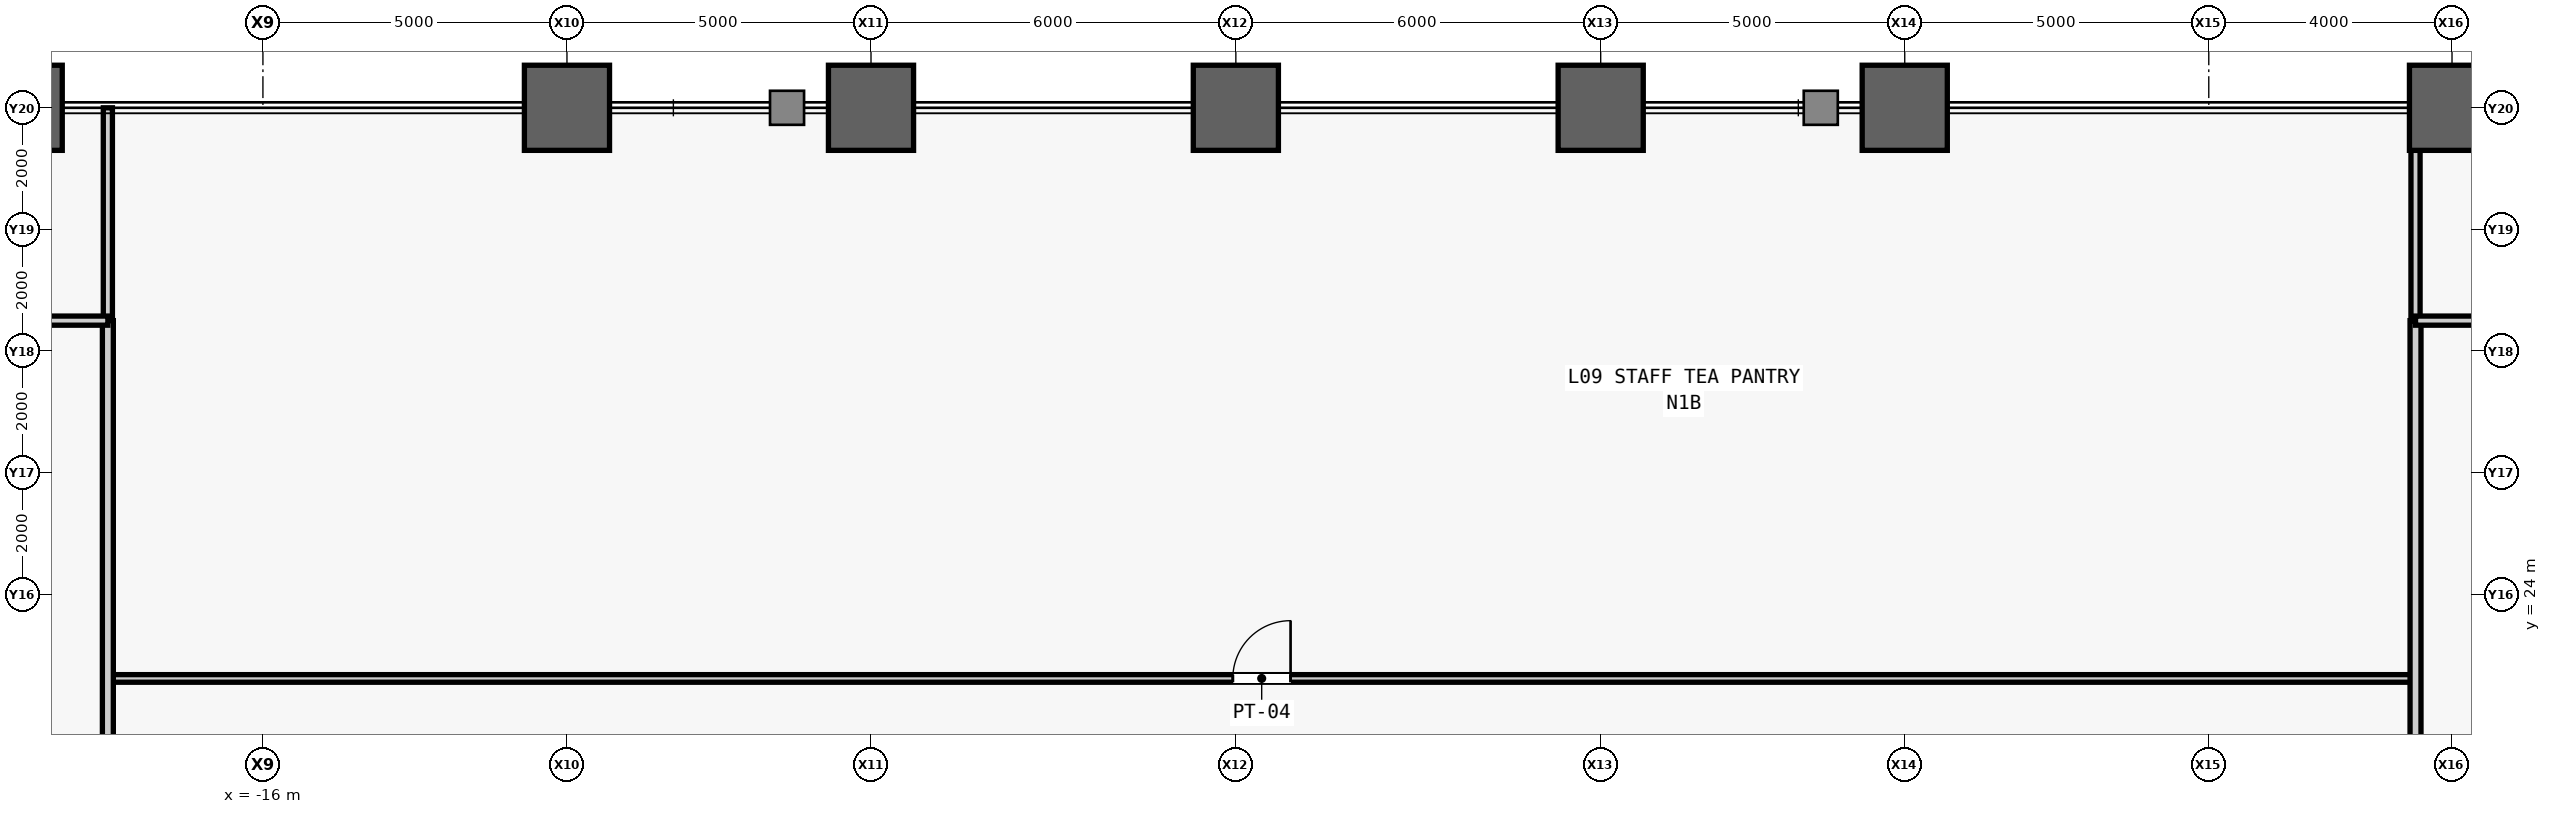
"""IFC4 building model, lengths in metres.
Left out: names, types, materials, properties, quantities, classifications, styles, units other than length and angle.
Written with IfcOpenShell. Run it as: python <this file> out.ifc"""

import sys

from ifc_helpers import new_model, si_unit, direction, frame, frame_2d, origin, origin_2d, place, context, subcontext, project, spatial, rectangle, hollow_rectangle, extrude, source, transform, mapped, element, fill, save


model = new_model("IFC4")
c1 = context("Model", 3, precision=1e-05, world=origin(), true_north=direction((0.0, 1.0)))
c2 = subcontext(c1, "Body", "Model", "MODEL_VIEW")
j1 = project(units=[si_unit("LENGTHUNIT", "METRE"), si_unit("PLANEANGLEUNIT", "RADIAN")], contexts=[c1])
p1 = place(None, origin())
s1 = spatial("IfcSite", under=j1, at=p1, CompositionType="ELEMENT")
p2 = place(p1, origin())
s2 = spatial("IfcBuilding", under=s1, at=p2, CompositionType="ELEMENT")
p3 = place(p2, frame((0.0, 0.0, 45.2)))
s3 = spatial("IfcBuildingStorey", under=s2, at=p3, CompositionType="ELEMENT", Elevation=45.2)
m1 = source(origin(), c2, "Body", "SweptSolid", [
    extrude(hollow_rectangle(XDim=1.4, YDim=1.4, WallThickness=0.075, at=origin_2d()), origin(), (0.0, 0.0, 1.0), 4.2),
])
for number, where, z_axis, x_axis in (
    (1, (-20.0, 32.0, 0.0), (0.0, 0.0, 1.0), (1.0, 0.0, 0.0)),
    (2, (-11.0, 32.0, 0.0), (0.0, 0.0, 1.0), (1.0, 0.0, 0.0)),
    (3, (-6.0, 32.0, 0.0), (0.0, 0.0, 1.0), (1.0, 0.0, 0.0)),
    (4, (0.0, 32.0, 0.0), (0.0, 0.0, 1.0), (1.0, 0.0, 0.0)),
    (5, (6.0, 32.0, 0.0), (0.0, 0.0, 1.0), (1.0, 0.0, 0.0)),
    (6, (11.0, 32.0, 0.0), (0.0, 0.0, 1.0), (1.0, 0.0, 0.0)),
    (7, (20.0, 32.0, 0.0), (0.0, 0.0, 1.0), (1.0, 0.0, 0.0)),
):
    element("IfcColumn", number, at=place(p3, frame(where, z_axis=z_axis, x_axis=x_axis)), inside=s3, PredefinedType="COLUMN", context=c2, shape_type="MappedRepresentation", body=[
        mapped(m1, transform((0.0, 0.0, 0.0), scale=1.0)),
    ])
m2 = source(origin(), c2, "Body", "SweptSolid", [
    extrude(rectangle(XDim=37.95, YDim=0.125, at=frame_2d((18.975, 0.0))), origin(), (0.0, 0.0, 1.0), 3.94),
])
p4 = place(p3, frame((-18.55, 22.616, 0.0), z_axis=(0.0, 0.0, 1.0), x_axis=(1.0, 0.0, 0.0)))
e8 = element("IfcWall", 8, at=p4, inside=s3, PredefinedType="PARTITIONING", context=c2, shape_type="MappedRepresentation", body=[
    mapped(m2, transform((0.0, 0.0, 0.0), scale=1.0)),
])
m3 = source(origin(), c2, "Body", "SweptSolid", [
    extrude(rectangle(XDim=0.95, YDim=2.15, at=frame_2d((0.475, 1.075))), frame((0.0, 0.073, 0.0), z_axis=(0.0, -1.0, 0.0), x_axis=(1.0, 0.0, 0.0)), (0.0, 0.0, 1.0), 0.145),
])
p5 = place(p4, frame((18.5, 0.0, 0.0)))
e9 = element("IfcOpeningElement", 9, at=p5, cuts=e8, PredefinedType="OPENING", context=c2, shape_type="MappedRepresentation", body=[
    mapped(m3, transform((0.0, 0.0, 0.0), scale=1.0)),
])
m4 = source(origin(), c2, "Body", "SweptSolid", [
    extrude(rectangle(XDim=3.5, YDim=0.15, at=frame_2d((1.75, 0.0))), origin(), (0.0, 0.0, 1.0), 3.94),
])
for number, where, z_axis, x_axis in (
    (10, (-18.55, 28.5, 0.0), (0.0, 0.0, 1.0), (0.0, 1.0, 0.0)),
    (11, (19.4, 28.5, 0.0), (0.0, 0.0, 1.0), (0.0, 1.0, 0.0)),
):
    element("IfcWall", number, at=place(p3, frame(where, z_axis=z_axis, x_axis=x_axis)), inside=s3, PredefinedType="PARTITIONING", context=c2, shape_type="MappedRepresentation", body=[
        mapped(m4, transform((0.0, 0.0, 0.0), scale=1.0)),
    ])
m5 = source(origin(), c2, "Body", "SweptSolid", [
    extrude(rectangle(XDim=57.0, YDim=0.18, at=frame_2d((28.5, 0.0))), origin(), (0.0, 0.0, 1.0), 3.94),
])
p6 = place(p3, frame((-18.55, -28.5, 0.0), z_axis=(0.0, 0.0, 1.0), x_axis=(0.0, 1.0, 0.0)))
e12 = element("IfcWall", 12, at=p6, inside=s3, PredefinedType="PARTITIONING", context=c2, shape_type="MappedRepresentation", body=[
    mapped(m5, transform((0.0, 0.0, 0.0), scale=1.0)),
])
m6 = source(origin(), c2, "Body", "SweptSolid", [
    extrude(rectangle(XDim=0.95, YDim=2.15, at=frame_2d((0.475, 1.075))), frame((0.0, 0.1, 0.0), z_axis=(0.0, -1.0, 0.0), x_axis=(1.0, 0.0, 0.0)), (0.0, 0.0, 1.0), 0.2),
])
p7 = place(p6, frame((18.615, 0.0, 0.0)))
e13 = element("IfcOpeningElement", 13, at=p7, cuts=e12, PredefinedType="OPENING", context=c2, shape_type="MappedRepresentation", body=[
    mapped(m6, transform((0.0, 0.0, 0.0), scale=1.0)),
])
p8 = place(p6, frame((27.472, 0.0, 0.0)))
e14 = element("IfcOpeningElement", 14, at=p8, cuts=e12, PredefinedType="OPENING", context=c2, shape_type="MappedRepresentation", body=[
    mapped(m6, transform((0.0, 0.0, 0.0), scale=1.0)),
])
p9 = place(p6, frame((36.607, 0.0, 0.0)))
e15 = element("IfcOpeningElement", 15, at=p9, cuts=e12, PredefinedType="OPENING", context=c2, shape_type="MappedRepresentation", body=[
    mapped(m6, transform((0.0, 0.0, 0.0), scale=1.0)),
])
m7 = source(origin(), c2, "Body", "SweptSolid", [
    extrude(rectangle(XDim=57.0, YDim=0.18, at=frame_2d((28.5, 0.0))), origin(), (0.0, 0.0, 1.0), 3.471),
])
p10 = place(p3, frame((19.4, -28.5, 0.0), z_axis=(0.0, 0.0, 1.0), x_axis=(0.0, 1.0, 0.0)))
e16 = element("IfcWall", 16, at=p10, inside=s3, PredefinedType="PARTITIONING", context=c2, shape_type="MappedRepresentation", body=[
    mapped(m7, transform((0.0, 0.0, 0.0), scale=1.0)),
])
p11 = place(p10, frame((27.75, 0.0, 0.0)))
e17 = element("IfcOpeningElement", 17, at=p11, cuts=e16, PredefinedType="OPENING", context=c2, shape_type="MappedRepresentation", body=[
    mapped(m6, transform((0.0, 0.0, 0.0), scale=1.0)),
])
m8 = source(origin(), c2, "Body", "SweptSolid", [
    extrude(rectangle(XDim=9.95, YDim=0.15, at=frame_2d((4.975, 0.0))), origin(), (0.0, 0.0, 1.0), 3.94),
])
p12 = place(p3, frame((-28.5, 28.5, 0.0), z_axis=(0.0, 0.0, 1.0), x_axis=(1.0, 0.0, 0.0)))
e18 = element("IfcWall", 18, at=p12, inside=s3, PredefinedType="PARTITIONING", context=c2, shape_type="MappedRepresentation", body=[
    mapped(m8, transform((0.0, 0.0, 0.0), scale=1.0)),
])
m9 = source(origin(), c2, "Body", "SweptSolid", [
    extrude(rectangle(XDim=0.95, YDim=2.15, at=frame_2d((0.475, 1.075))), frame((0.0, 0.085, 0.0), z_axis=(0.0, -1.0, 0.0), x_axis=(1.0, 0.0, 0.0)), (0.0, 0.0, 1.0), 0.17),
])
p13 = place(p12, frame((4.5, 0.0, 0.0)))
e19 = element("IfcOpeningElement", 19, at=p13, cuts=e18, PredefinedType="OPENING", context=c2, shape_type="MappedRepresentation", body=[
    mapped(m9, transform((0.0, 0.0, 0.0), scale=1.0)),
])
m10 = source(origin(), c2, "Body", "SweptSolid", [
    extrude(rectangle(XDim=9.1, YDim=0.15, at=frame_2d((4.55, 0.0))), origin(), (0.0, 0.0, 1.0), 3.94),
])
p14 = place(p3, frame((19.4, 28.5, 0.0), z_axis=(0.0, 0.0, 1.0), x_axis=(1.0, 0.0, 0.0)))
e20 = element("IfcWall", 20, at=p14, inside=s3, PredefinedType="PARTITIONING", context=c2, shape_type="MappedRepresentation", body=[
    mapped(m10, transform((0.0, 0.0, 0.0), scale=1.0)),
])
p15 = place(p14, frame((4.075, 0.0, 0.0)))
e21 = element("IfcOpeningElement", 21, at=p15, cuts=e20, PredefinedType="OPENING", context=c2, shape_type="MappedRepresentation", body=[
    mapped(m9, transform((0.0, 0.0, 0.0), scale=1.0)),
])
m11 = source(origin(), c2, "Body", "SweptSolid", [
    extrude(rectangle(XDim=0.95, YDim=2.15, at=frame_2d((0.475, 1.075))), frame((0.0, 0.025, 0.0), z_axis=(0.0, -1.0, 0.0), x_axis=(1.0, 0.0, 0.0)), (0.0, 0.0, 1.0), 0.05),
])
p16 = place(p5, origin())
e22 = element("IfcDoor", 22, at=p16, inside=s3, OperationType="SINGLE_SWING_RIGHT", PredefinedType="DOOR", context=c2, shape_type="MappedRepresentation", body=[
    mapped(m11, transform((0.0, 0.0, 0.0), scale=1.0)),
])
fill(e9, e22)
save(model, sys.argv[1])
